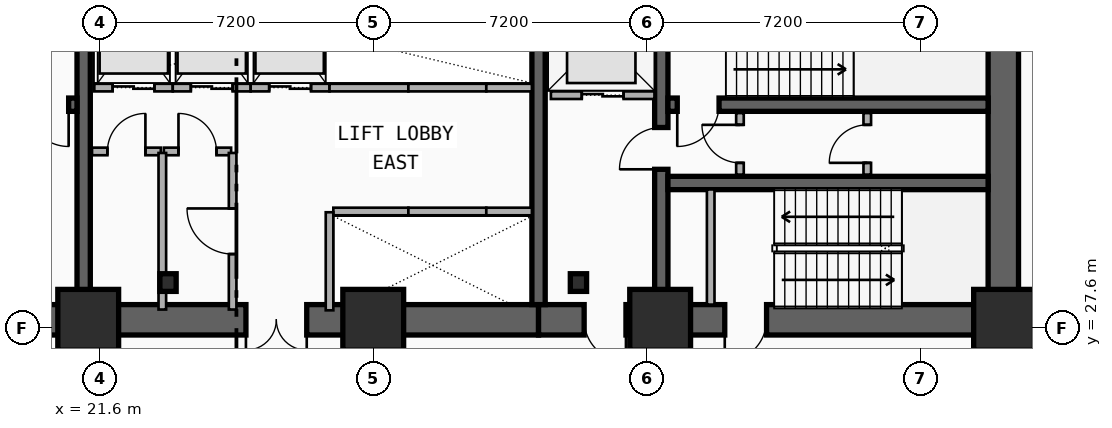
"""IFC4 building model, lengths in metres.
Left out: names, types, materials, properties, quantities, classifications, styles, units other than length and angle.
Written with IfcOpenShell. Run it as: python <this file> out.ifc"""

import sys

from ifc_helpers import new_model, si_unit, direction, frame, frame_2d, origin, origin_2d, place, context, subcontext, project, spatial, rectangle, i_section, extrude, element, fill, save


model = new_model("IFC4")
c1 = context("Model", 3, precision=1e-05, world=origin(), true_north=direction((0.0, 1.0)))
c2 = subcontext(c1, "Body", "Model", "MODEL_VIEW")
j1 = project(units=[si_unit("LENGTHUNIT", "METRE"), si_unit("PLANEANGLEUNIT", "RADIAN")], contexts=[c1])
p1 = place(None, origin())
s1 = spatial("IfcSite", under=j1, at=p1, CompositionType="ELEMENT")
p2 = place(p1, origin())
s2 = spatial("IfcBuilding", under=s1, at=p2, CompositionType="ELEMENT")
p3 = place(p2, frame((0.0, 0.0, 24.2)))
s3 = spatial("IfcBuildingStorey", under=s2, at=p3, CompositionType="ELEMENT", Elevation=24.2)
p4 = place(p3, frame((21.18, 27.82, 0.0), z_axis=(0.0, 0.0, 1.0), x_axis=(-1.0, 0.0, 0.0)))
e1 = element("IfcWall", 1, at=p4, inside=s3, PredefinedType="SHEAR", context=c2, shape_type="SweptSolid", body=[
    extrude(rectangle(XDim=9.03, YDim=0.8, at=frame_2d((4.515, 0.0))), origin(), (0.0, 0.0, 1.0), 4.8),
])
p5 = place(p4, frame((2.68, 0.0, 0.0)))
e2 = element("IfcOpeningElement", 2, at=p5, cuts=e1, PredefinedType="OPENING", context=c2, shape_type="SweptSolid", body=[
    extrude(rectangle(XDim=1.1, YDim=2.15, at=frame_2d((0.55, 1.075))), frame((0.0, 0.41, 0.0), z_axis=(0.0, -1.0, 0.0), x_axis=(1.0, 0.0, 0.0)), (0.0, 0.0, 1.0), 0.82),
])
p6 = place(p3, frame((33.15, 27.82, 0.0), z_axis=(0.0, 0.0, 1.0), x_axis=(-1.0, 0.0, 0.0)))
e3 = element("IfcWall", 3, at=p6, inside=s3, PredefinedType="SHEAR", context=c2, shape_type="SweptSolid", body=[
    extrude(rectangle(XDim=11.97, YDim=0.8, at=frame_2d((5.985, 0.0))), origin(), (0.0, 0.0, 1.0), 4.8),
])
p7 = place(p6, frame((6.1, 0.0, 0.0)))
e4 = element("IfcOpeningElement", 4, at=p7, cuts=e3, PredefinedType="OPENING", context=c2, shape_type="SweptSolid", body=[
    extrude(rectangle(XDim=1.6, YDim=2.2, at=frame_2d((0.8, 1.1))), frame((0.0, 0.41, 0.0), z_axis=(0.0, -1.0, 0.0), x_axis=(1.0, 0.0, 0.0)), (0.0, 0.0, 1.0), 0.82),
])
p8 = place(p3, frame((45.38, 27.82, 0.0), z_axis=(0.0, 0.0, 1.0), x_axis=(-1.0, 0.0, 0.0)))
e5 = element("IfcWall", 5, at=p8, inside=s3, PredefinedType="SHEAR", context=c2, shape_type="SweptSolid", body=[
    extrude(rectangle(XDim=12.23, YDim=0.8, at=frame_2d((6.115, 0.0))), origin(), (0.0, 0.0, 1.0), 4.8),
])
p9 = place(p8, frame((9.93, 0.0, 0.0)))
e6 = element("IfcOpeningElement", 6, at=p9, cuts=e5, PredefinedType="OPENING", context=c2, shape_type="SweptSolid", body=[
    extrude(rectangle(XDim=1.1, YDim=2.15, at=frame_2d((0.55, 1.075))), frame((0.0, 0.41, 0.0), z_axis=(0.0, -1.0, 0.0), x_axis=(1.0, 0.0, 0.0)), (0.0, 0.0, 1.0), 0.82),
])
p10 = place(p8, frame((6.23, 0.0, 0.0)))
e7 = element("IfcOpeningElement", 7, at=p10, cuts=e5, PredefinedType="OPENING", context=c2, shape_type="SweptSolid", body=[
    extrude(rectangle(XDim=1.1, YDim=2.15, at=frame_2d((0.55, 1.075))), frame((0.0, 0.41, 0.0), z_axis=(0.0, -1.0, 0.0), x_axis=(1.0, 0.0, 0.0)), (0.0, 0.0, 1.0), 0.82),
])
p11 = place(p3, frame((45.38, 28.22, 0.0), z_axis=(0.0, 0.0, 1.0), x_axis=(0.0, 1.0, 0.0)))
e8 = element("IfcWall", 8, at=p11, inside=s3, PredefinedType="SHEAR", context=c2, shape_type="SweptSolid", body=[
    extrude(rectangle(XDim=8.43, YDim=0.8, at=frame_2d((4.215, 0.0))), origin(), (0.0, 0.0, 1.0), 4.8),
])
for number, where, z_axis, x_axis in (
    (9, (21.18, 28.22, 0.0), (0.0, 0.0, 1.0), (0.0, 1.0, 0.0)),
    (10, (33.15, 28.22, 0.0), (0.0, 0.0, 1.0), (0.0, 1.0, 0.0)),
):
    element("IfcWall", number, at=place(p3, frame(where, z_axis=z_axis, x_axis=x_axis)), inside=s3, PredefinedType="SHEAR", context=c2, shape_type="SweptSolid", body=[
        extrude(rectangle(XDim=8.43, YDim=0.35, at=frame_2d((4.215, 0.0))), origin(), (0.0, 0.0, 1.0), 4.8),
    ])
p12 = place(p3, frame((36.38, 28.22, 0.0), z_axis=(0.0, 0.0, 1.0), x_axis=(0.0, 1.0, 0.0)))
e11 = element("IfcWall", 11, at=p12, inside=s3, PredefinedType="SHEAR", context=c2, shape_type="SweptSolid", body=[
    extrude(rectangle(XDim=8.43, YDim=0.35, at=frame_2d((4.215, 0.0))), origin(), (0.0, 0.0, 1.0), 4.8),
])
p13 = place(p12, frame((3.56, 0.0, 0.0)))
e12 = element("IfcOpeningElement", 12, at=p13, cuts=e11, PredefinedType="OPENING", context=c2, shape_type="SweptSolid", body=[
    extrude(rectangle(XDim=1.1, YDim=2.15, at=frame_2d((0.55, 1.075))), frame((0.0, 0.185, 0.0), z_axis=(0.0, -1.0, 0.0), x_axis=(1.0, 0.0, 0.0)), (0.0, 0.0, 1.0), 0.37),
])
p14 = place(p3, frame((21.005, 33.48, 0.0), z_axis=(0.0, 0.0, 1.0), x_axis=(-1.0, 0.0, 0.0)))
e13 = element("IfcWall", 13, at=p14, inside=s3, PredefinedType="SHEAR", context=c2, shape_type="SweptSolid", body=[
    extrude(rectangle(XDim=8.455, YDim=0.35, at=frame_2d((4.228, 0.0))), origin(), (0.0, 0.0, 1.0), 4.8),
])
p15 = place(p14, frame((0.22, 0.0, 0.0)))
e14 = element("IfcOpeningElement", 14, at=p15, cuts=e13, PredefinedType="OPENING", context=c2, shape_type="SweptSolid", body=[
    extrude(rectangle(XDim=1.1, YDim=2.15, at=frame_2d((0.55, 1.075))), frame((0.0, 0.185, 0.0), z_axis=(0.0, -1.0, 0.0), x_axis=(1.0, 0.0, 0.0)), (0.0, 0.0, 1.0), 0.37),
])
p16 = place(p3, frame((44.98, 33.48, 0.0), z_axis=(0.0, 0.0, 1.0), x_axis=(-1.0, 0.0, 0.0)))
e15 = element("IfcWall", 15, at=p16, inside=s3, PredefinedType="SHEAR", context=c2, shape_type="SweptSolid", body=[
    extrude(rectangle(XDim=8.425, YDim=0.35, at=frame_2d((4.212, 0.0))), origin(), (0.0, 0.0, 1.0), 4.8),
])
p17 = place(p16, frame((7.08, 0.0, 0.0)))
e16 = element("IfcOpeningElement", 16, at=p17, cuts=e15, PredefinedType="OPENING", context=c2, shape_type="SweptSolid", body=[
    extrude(rectangle(XDim=1.1, YDim=2.15, at=frame_2d((0.55, 1.075))), frame((0.0, 0.185, 0.0), z_axis=(0.0, -1.0, 0.0), x_axis=(1.0, 0.0, 0.0)), (0.0, 0.0, 1.0), 0.37),
])
p18 = place(p3, frame((36.555, 31.42, 0.0), z_axis=(0.0, 0.0, 1.0), x_axis=(1.0, 0.0, 0.0)))
e17 = element("IfcWall", 17, at=p18, inside=s3, PredefinedType="SHEAR", context=c2, shape_type="SweptSolid", body=[
    extrude(rectangle(XDim=8.425, YDim=0.35, at=frame_2d((4.212, 0.0))), origin(), (0.0, 0.0, 1.0), 4.8),
])
for number, where, z_axis, x_axis in (
    (18, (23.4, 28.8, 0.0), (0.0, 0.0, 1.0), (1.0, 0.0, 0.0)),
    (19, (34.2, 28.8, 0.0), (0.0, 0.0, 1.0), (1.0, 0.0, 0.0)),
):
    element("IfcColumn", number, at=place(p3, frame(where, z_axis=z_axis, x_axis=x_axis)), inside=s3, PredefinedType="COLUMN", context=c2, shape_type="SweptSolid", body=[
        extrude(i_section(OverallWidth=0.428, OverallDepth=0.465, WebThickness=0.045, FlangeThickness=0.073, FilletRadius=0.015, at=origin_2d()), origin(), (0.0, 0.0, 1.0), 4.8),
    ])
for number, where, z_axis, x_axis in (
    (20, (21.3, 27.82, 0.0), (0.0, 0.0, 1.0), (1.0, 0.0, 0.0)),
    (21, (28.8, 27.82, 0.0), (0.0, 0.0, 1.0), (1.0, 0.0, 0.0)),
    (22, (36.35, 27.82, 0.0), (0.0, 0.0, 1.0), (1.0, 0.0, 0.0)),
    (23, (45.4, 27.82, 0.0), (0.0, 0.0, 1.0), (1.0, 0.0, 0.0)),
):
    element("IfcColumn", number, at=place(p3, frame(where, z_axis=z_axis, x_axis=x_axis)), inside=s3, PredefinedType="COLUMN", context=c2, shape_type="SweptSolid", body=[
        extrude(rectangle(XDim=1.6, YDim=1.6, at=origin_2d()), origin(), (0.0, 0.0, 1.0), 4.8),
    ])
p19 = place(p3, frame((33.475, 33.73, 0.0), z_axis=(0.0, 0.0, 1.0), x_axis=(1.0, 0.0, 0.0)))
e24 = element("IfcWall", 24, at=p19, inside=s3, PredefinedType="PARTITIONING", context=c2, shape_type="SweptSolid", body=[
    extrude(rectangle(XDim=2.725, YDim=0.2, at=frame_2d((1.362, 0.0))), origin(), (0.0, 0.0, 1.0), 3.452),
])
p20 = place(p19, frame((0.812, 0.0, 0.0)))
e25 = element("IfcOpeningElement", 25, at=p20, cuts=e24, PredefinedType="OPENING", context=c2, shape_type="SweptSolid", body=[
    extrude(rectangle(XDim=1.1, YDim=2.15, at=frame_2d((0.55, 1.075))), frame((0.0, 0.11, 0.0), z_axis=(0.0, -1.0, 0.0), x_axis=(1.0, 0.0, 0.0)), (0.0, 0.0, 1.0), 0.22),
])
p21 = place(p3, frame((27.75, 30.67, 0.0), z_axis=(0.0, 0.0, 1.0), x_axis=(1.0, 0.0, 0.0)))
e26 = element("IfcWall", 26, at=p21, inside=s3, PredefinedType="PARTITIONING", context=c2, shape_type="SweptSolid", body=[
    extrude(rectangle(XDim=1.975, YDim=0.2, at=frame_2d((0.988, 0.0))), origin(), (0.0, 0.0, 1.0), 3.452),
])
p22 = place(p3, frame((27.65, 28.07, 0.0), z_axis=(0.0, 0.0, 1.0), x_axis=(0.0, 1.0, 0.0)))
e27 = element("IfcWall", 27, at=p22, inside=s3, PredefinedType="PARTITIONING", context=c2, shape_type="SweptSolid", body=[
    extrude(rectangle(XDim=2.58, YDim=0.2, at=frame_2d((1.29, 0.0))), origin(), (0.0, 0.0, 1.0), 3.452),
])
p23 = place(p3, frame((29.725, 30.67, 0.0), z_axis=(0.0, 0.0, 1.0), x_axis=(1.0, 0.0, 0.0)))
e28 = element("IfcWall", 28, at=p23, inside=s3, PredefinedType="PARTITIONING", context=c2, shape_type="SweptSolid", body=[
    extrude(rectangle(XDim=2.05, YDim=0.2, at=frame_2d((1.025, 0.0))), origin(), (0.0, 0.0, 1.0), 4.48),
])
p24 = place(p3, frame((31.775, 30.67, 0.0), z_axis=(0.0, 0.0, 1.0), x_axis=(1.0, 0.0, 0.0)))
e29 = element("IfcWall", 29, at=p24, inside=s3, PredefinedType="PARTITIONING", context=c2, shape_type="SweptSolid", body=[
    extrude(rectangle(XDim=1.2, YDim=0.2, at=frame_2d((0.6, 0.0))), origin(), (0.0, 0.0, 1.0), 4.48),
])
p25 = place(p3, frame((21.46, 33.93, 0.0), z_axis=(0.0, 0.0, 1.0), x_axis=(1.0, 0.0, 0.0)))
e30 = element("IfcWall", 30, at=p25, inside=s3, PredefinedType="PARTITIONING", context=c2, shape_type="SweptSolid", body=[
    extrude(rectangle(XDim=2.065, YDim=0.2, at=frame_2d((1.032, 0.0))), origin(), (0.0, 0.0, 1.0), 3.452),
])
p26 = place(p25, frame((0.482, 0.0, 0.0)))
e31 = element("IfcOpeningElement", 31, at=p26, cuts=e30, PredefinedType="OPENING", context=c2, shape_type="SweptSolid", body=[
    extrude(rectangle(XDim=1.1, YDim=2.15, at=frame_2d((0.55, 1.075))), frame((0.0, 0.11, 0.0), z_axis=(0.0, -1.0, 0.0), x_axis=(1.0, 0.0, 0.0)), (0.0, 0.0, 1.0), 0.22),
])
p27 = place(p3, frame((23.525, 33.93, 0.0), z_axis=(0.0, 0.0, 1.0), x_axis=(1.0, 0.0, 0.0)))
e32 = element("IfcWall", 32, at=p27, inside=s3, PredefinedType="PARTITIONING", context=c2, shape_type="SweptSolid", body=[
    extrude(rectangle(XDim=2.05, YDim=0.2, at=frame_2d((1.025, 0.0))), origin(), (0.0, 0.0, 1.0), 4.48),
])
p28 = place(p27, frame((0.475, 0.0, 0.0)))
e33 = element("IfcOpeningElement", 33, at=p28, cuts=e32, PredefinedType="OPENING", context=c2, shape_type="SweptSolid", body=[
    extrude(rectangle(XDim=1.1, YDim=2.15, at=frame_2d((0.55, 1.075))), frame((0.0, 0.11, 0.0), z_axis=(0.0, -1.0, 0.0), x_axis=(1.0, 0.0, 0.0)), (0.0, 0.0, 1.0), 0.22),
])
p29 = place(p3, frame((25.575, 33.93, 0.0), z_axis=(0.0, 0.0, 1.0), x_axis=(1.0, 0.0, 0.0)))
e34 = element("IfcWall", 34, at=p29, inside=s3, PredefinedType="PARTITIONING", context=c2, shape_type="SweptSolid", body=[
    extrude(rectangle(XDim=2.075, YDim=0.2, at=frame_2d((1.038, 0.0))), origin(), (0.0, 0.0, 1.0), 4.48),
])
p30 = place(p29, frame((0.488, 0.0, 0.0)))
e35 = element("IfcOpeningElement", 35, at=p30, cuts=e34, PredefinedType="OPENING", context=c2, shape_type="SweptSolid", body=[
    extrude(rectangle(XDim=1.1, YDim=2.15, at=frame_2d((0.55, 1.075))), frame((0.0, 0.11, 0.0), z_axis=(0.0, -1.0, 0.0), x_axis=(1.0, 0.0, 0.0)), (0.0, 0.0, 1.0), 0.22),
])
p31 = place(p3, frame((27.65, 33.93, 0.0), z_axis=(0.0, 0.0, 1.0), x_axis=(1.0, 0.0, 0.0)))
e36 = element("IfcWall", 36, at=p31, inside=s3, PredefinedType="PARTITIONING", context=c2, shape_type="SweptSolid", body=[
    extrude(rectangle(XDim=2.075, YDim=0.2, at=frame_2d((1.038, 0.0))), origin(), (0.0, 0.0, 1.0), 3.452),
])
p32 = place(p3, frame((29.725, 33.93, 0.0), z_axis=(0.0, 0.0, 1.0), x_axis=(1.0, 0.0, 0.0)))
e37 = element("IfcWall", 37, at=p32, inside=s3, PredefinedType="PARTITIONING", context=c2, shape_type="SweptSolid", body=[
    extrude(rectangle(XDim=2.05, YDim=0.2, at=frame_2d((1.025, 0.0))), origin(), (0.0, 0.0, 1.0), 4.48),
])
p33 = place(p3, frame((31.775, 33.93, 0.0), z_axis=(0.0, 0.0, 1.0), x_axis=(1.0, 0.0, 0.0)))
e38 = element("IfcWall", 38, at=p33, inside=s3, PredefinedType="PARTITIONING", context=c2, shape_type="SweptSolid", body=[
    extrude(rectangle(XDim=1.2, YDim=0.2, at=frame_2d((0.6, 0.0))), origin(), (0.0, 0.0, 1.0), 4.48),
])
p34 = place(p3, frame((37.68, 28.22, 0.0), z_axis=(0.0, 0.0, 1.0), x_axis=(0.0, 1.0, 0.0)))
e39 = element("IfcWall", 39, at=p34, inside=s3, PredefinedType="PARTITIONING", context=c2, shape_type="SweptSolid", body=[
    extrude(rectangle(XDim=3.03, YDim=0.2, at=frame_2d((1.515, 0.0))), origin(), (0.0, 0.0, 1.0), 4.48),
])
p35 = place(p3, frame((38.45, 31.64, 0.0), z_axis=(0.0, 0.0, 1.0), x_axis=(0.0, 1.0, 0.0)))
e40 = element("IfcWall", 40, at=p35, inside=s3, PredefinedType="PARTITIONING", context=c2, shape_type="SweptSolid", body=[
    extrude(rectangle(XDim=1.62, YDim=0.2, at=frame_2d((0.81, 0.0))), origin(), (0.0, 0.0, 1.0), 4.48),
])
p36 = place(p35, frame((0.31, 0.0, 0.0)))
e41 = element("IfcOpeningElement", 41, at=p36, cuts=e40, PredefinedType="OPENING", context=c2, shape_type="SweptSolid", body=[
    extrude(rectangle(XDim=1.0, YDim=2.15, at=frame_2d((0.5, 1.075))), frame((0.0, 0.11, 0.0), z_axis=(0.0, -1.0, 0.0), x_axis=(1.0, 0.0, 0.0)), (0.0, 0.0, 1.0), 0.22),
])
p37 = place(p3, frame((41.8, 31.64, 0.0), z_axis=(0.0, 0.0, 1.0), x_axis=(0.0, 1.0, 0.0)))
e42 = element("IfcWall", 42, at=p37, inside=s3, PredefinedType="PARTITIONING", context=c2, shape_type="SweptSolid", body=[
    extrude(rectangle(XDim=1.62, YDim=0.2, at=frame_2d((0.81, 0.0))), origin(), (0.0, 0.0, 1.0), 4.48),
])
p38 = place(p37, frame((0.31, 0.0, 0.0)))
e43 = element("IfcOpeningElement", 43, at=p38, cuts=e42, PredefinedType="OPENING", context=c2, shape_type="SweptSolid", body=[
    extrude(rectangle(XDim=1.0, YDim=2.15, at=frame_2d((0.5, 1.075))), frame((0.0, 0.11, 0.0), z_axis=(0.0, -1.0, 0.0), x_axis=(1.0, 0.0, 0.0)), (0.0, 0.0, 1.0), 0.22),
])
p39 = place(p3, frame((21.4, 32.25, 0.0), z_axis=(0.0, 0.0, 1.0), x_axis=(1.0, 0.0, 0.0)))
e44 = element("IfcWall", 44, at=p39, inside=s3, PredefinedType="PARTITIONING", context=c2, shape_type="SweptSolid", body=[
    extrude(rectangle(XDim=1.81, YDim=0.2, at=frame_2d((0.905, 0.0))), origin(), (0.0, 0.0, 1.0), 3.452),
])
p40 = place(p39, frame((0.405, 0.0, 0.0)))
e45 = element("IfcOpeningElement", 45, at=p40, cuts=e44, PredefinedType="OPENING", context=c2, shape_type="SweptSolid", body=[
    extrude(rectangle(XDim=1.0, YDim=2.15, at=frame_2d((0.5, 1.075))), frame((0.0, 0.11, 0.0), z_axis=(0.0, -1.0, 0.0), x_axis=(1.0, 0.0, 0.0)), (0.0, 0.0, 1.0), 0.22),
])
p41 = place(p3, frame((23.29, 32.25, 0.0), z_axis=(0.0, 0.0, 1.0), x_axis=(1.0, 0.0, 0.0)))
e46 = element("IfcWall", 46, at=p41, inside=s3, PredefinedType="PARTITIONING", context=c2, shape_type="SweptSolid", body=[
    extrude(rectangle(XDim=1.77, YDim=0.2, at=frame_2d((0.885, 0.0))), origin(), (0.0, 0.0, 1.0), 4.48),
])
p42 = place(p41, frame((0.385, 0.0, 0.0)))
e47 = element("IfcOpeningElement", 47, at=p42, cuts=e46, PredefinedType="OPENING", context=c2, shape_type="SweptSolid", body=[
    extrude(rectangle(XDim=1.0, YDim=2.15, at=frame_2d((0.5, 1.075))), frame((0.0, 0.11, 0.0), z_axis=(0.0, -1.0, 0.0), x_axis=(1.0, 0.0, 0.0)), (0.0, 0.0, 1.0), 0.22),
])
p43 = place(p3, frame((25.1, 28.09, 0.0), z_axis=(0.0, 0.0, 1.0), x_axis=(0.0, 1.0, 0.0)))
e48 = element("IfcWall", 48, at=p43, inside=s3, PredefinedType="PARTITIONING", context=c2, shape_type="SweptSolid", body=[
    extrude(rectangle(XDim=4.12, YDim=0.2, at=frame_2d((2.06, 0.0))), origin(), (0.0, 0.0, 1.0), 4.48),
])
p44 = place(p43, frame((1.46, 0.0, 0.0)))
e49 = element("IfcOpeningElement", 49, at=p44, cuts=e48, PredefinedType="OPENING", context=c2, shape_type="SweptSolid", body=[
    extrude(rectangle(XDim=1.2, YDim=2.15, at=frame_2d((0.6, 1.075))), frame((0.0, 0.11, 0.0), z_axis=(0.0, -1.0, 0.0), x_axis=(1.0, 0.0, 0.0)), (0.0, 0.0, 1.0), 0.22),
])
p45 = place(p3, frame((23.25, 28.09, 0.0), z_axis=(0.0, 0.0, 1.0), x_axis=(0.0, 1.0, 0.0)))
e50 = element("IfcWall", 50, at=p45, inside=s3, PredefinedType="PARTITIONING", context=c2, shape_type="SweptSolid", body=[
    extrude(rectangle(XDim=4.12, YDim=0.2, at=frame_2d((2.06, 0.0))), origin(), (0.0, 0.0, 1.0), 4.48),
])
p46 = place(p3, frame((45.41, 27.6, 0.0), z_axis=(0.0, 0.0, 1.0), x_axis=(1.0, 0.0, 0.0)))
e51 = element("IfcWall", 51, at=p46, inside=s3, PredefinedType="PARTITIONING", context=c2, shape_type="SweptSolid", body=[
    extrude(rectangle(XDim=0.91, YDim=0.16, at=frame_2d((0.455, 0.0))), origin(), (0.0, 0.0, 1.0), 3.452),
])
p47 = place(p20, origin())
e52 = element("IfcDoor", 52, at=p47, inside=s3, OperationType="DOUBLE_DOOR_SLIDING", PredefinedType="DOOR", context=c2, shape_type="SweptSolid", body=[
    extrude(rectangle(XDim=1.1, YDim=2.15, at=frame_2d((0.55, 1.075))), frame((0.0, 0.025, 0.0), z_axis=(0.0, -1.0, 0.0), x_axis=(1.0, 0.0, 0.0)), (0.0, 0.0, 1.0), 0.05),
])
fill(e25, e52)
p48 = place(p26, origin())
e53 = element("IfcDoor", 53, at=p48, inside=s3, OperationType="DOUBLE_DOOR_SLIDING", PredefinedType="DOOR", context=c2, shape_type="SweptSolid", body=[
    extrude(rectangle(XDim=1.1, YDim=2.15, at=frame_2d((0.55, 1.075))), frame((0.0, 0.025, 0.0), z_axis=(0.0, -1.0, 0.0), x_axis=(1.0, 0.0, 0.0)), (0.0, 0.0, 1.0), 0.05),
])
fill(e31, e53)
p49 = place(p28, origin())
e54 = element("IfcDoor", 54, at=p49, inside=s3, OperationType="DOUBLE_DOOR_SLIDING", PredefinedType="DOOR", context=c2, shape_type="SweptSolid", body=[
    extrude(rectangle(XDim=1.1, YDim=2.15, at=frame_2d((0.55, 1.075))), frame((0.0, 0.025, 0.0), z_axis=(0.0, -1.0, 0.0), x_axis=(1.0, 0.0, 0.0)), (0.0, 0.0, 1.0), 0.05),
])
fill(e33, e54)
p50 = place(p30, origin())
e55 = element("IfcDoor", 55, at=p50, inside=s3, OperationType="DOUBLE_DOOR_SLIDING", PredefinedType="DOOR", context=c2, shape_type="SweptSolid", body=[
    extrude(rectangle(XDim=1.1, YDim=2.15, at=frame_2d((0.55, 1.075))), frame((0.0, 0.025, 0.0), z_axis=(0.0, -1.0, 0.0), x_axis=(1.0, 0.0, 0.0)), (0.0, 0.0, 1.0), 0.05),
])
fill(e35, e55)
p51 = place(p15, origin())
e56 = element("IfcDoor", 56, at=p51, inside=s3, OperationType="SINGLE_SWING_LEFT", PredefinedType="DOOR", context=c2, shape_type="SweptSolid", body=[
    extrude(rectangle(XDim=1.1, YDim=2.15, at=frame_2d((0.55, 1.075))), frame((0.0, 0.025, 0.0), z_axis=(0.0, -1.0, 0.0), x_axis=(1.0, 0.0, 0.0)), (0.0, 0.0, 1.0), 0.05),
])
fill(e14, e56)
p52 = place(p17, origin())
e57 = element("IfcDoor", 57, at=p52, inside=s3, OperationType="SINGLE_SWING_RIGHT", PredefinedType="DOOR", context=c2, shape_type="SweptSolid", body=[
    extrude(rectangle(XDim=1.1, YDim=2.15, at=frame_2d((0.55, 1.075))), frame((0.0, 0.025, 0.0), z_axis=(0.0, -1.0, 0.0), x_axis=(1.0, 0.0, 0.0)), (0.0, 0.0, 1.0), 0.05),
])
fill(e16, e57)
p53 = place(p13, origin())
e58 = element("IfcDoor", 58, at=p53, inside=s3, OperationType="SINGLE_SWING_LEFT", PredefinedType="DOOR", context=c2, shape_type="SweptSolid", body=[
    extrude(rectangle(XDim=1.1, YDim=2.15, at=frame_2d((0.55, 1.075))), frame((0.0, 0.025, 0.0), z_axis=(0.0, -1.0, 0.0), x_axis=(1.0, 0.0, 0.0)), (0.0, 0.0, 1.0), 0.05),
])
fill(e12, e58)
p54 = place(p9, origin())
e59 = element("IfcDoor", 59, at=p54, inside=s3, OperationType="SINGLE_SWING_LEFT", PredefinedType="DOOR", context=c2, shape_type="SweptSolid", body=[
    extrude(rectangle(XDim=1.1, YDim=2.15, at=frame_2d((0.55, 1.075))), frame((0.0, 0.025, 0.0), z_axis=(0.0, -1.0, 0.0), x_axis=(1.0, 0.0, 0.0)), (0.0, 0.0, 1.0), 0.05),
])
fill(e6, e59)
p55 = place(p10, origin())
e60 = element("IfcDoor", 60, at=p55, inside=s3, OperationType="SINGLE_SWING_RIGHT", PredefinedType="DOOR", context=c2, shape_type="SweptSolid", body=[
    extrude(rectangle(XDim=1.1, YDim=2.15, at=frame_2d((0.55, 1.075))), frame((0.0, 0.025, 0.0), z_axis=(0.0, -1.0, 0.0), x_axis=(1.0, 0.0, 0.0)), (0.0, 0.0, 1.0), 0.05),
])
fill(e7, e60)
p56 = place(p7, origin())
e61 = element("IfcDoor", 61, at=p56, inside=s3, OperationType="SINGLE_SWING_LEFT", PredefinedType="DOOR", context=c2, shape_type="SweptSolid", body=[
    extrude(rectangle(XDim=1.6, YDim=2.2, at=frame_2d((0.8, 1.1))), frame((0.0, 0.025, 0.0), z_axis=(0.0, -1.0, 0.0), x_axis=(1.0, 0.0, 0.0)), (0.0, 0.0, 1.0), 0.05),
])
fill(e4, e61)
p57 = place(p36, origin())
e62 = element("IfcDoor", 62, at=p57, inside=s3, OperationType="SINGLE_SWING_RIGHT", PredefinedType="DOOR", context=c2, shape_type="SweptSolid", body=[
    extrude(rectangle(XDim=1.0, YDim=2.15, at=frame_2d((0.5, 1.075))), frame((0.0, 0.025, 0.0), z_axis=(0.0, -1.0, 0.0), x_axis=(1.0, 0.0, 0.0)), (0.0, 0.0, 1.0), 0.05),
])
fill(e41, e62)
p58 = place(p38, origin())
e63 = element("IfcDoor", 63, at=p58, inside=s3, OperationType="SINGLE_SWING_LEFT", PredefinedType="DOOR", context=c2, shape_type="SweptSolid", body=[
    extrude(rectangle(XDim=1.0, YDim=2.15, at=frame_2d((0.5, 1.075))), frame((0.0, 0.025, 0.0), z_axis=(0.0, -1.0, 0.0), x_axis=(1.0, 0.0, 0.0)), (0.0, 0.0, 1.0), 0.05),
])
fill(e43, e63)
p59 = place(p40, origin())
e64 = element("IfcDoor", 64, at=p59, inside=s3, OperationType="SINGLE_SWING_RIGHT", PredefinedType="DOOR", context=c2, shape_type="SweptSolid", body=[
    extrude(rectangle(XDim=1.0, YDim=2.15, at=frame_2d((0.5, 1.075))), frame((0.0, 0.025, 0.0), z_axis=(0.0, -1.0, 0.0), x_axis=(1.0, 0.0, 0.0)), (0.0, 0.0, 1.0), 0.05),
])
fill(e45, e64)
p60 = place(p42, origin())
e65 = element("IfcDoor", 65, at=p60, inside=s3, OperationType="SINGLE_SWING_LEFT", PredefinedType="DOOR", context=c2, shape_type="SweptSolid", body=[
    extrude(rectangle(XDim=1.0, YDim=2.15, at=frame_2d((0.5, 1.075))), frame((0.0, 0.025, 0.0), z_axis=(0.0, -1.0, 0.0), x_axis=(1.0, 0.0, 0.0)), (0.0, 0.0, 1.0), 0.05),
])
fill(e47, e65)
p61 = place(p44, origin())
e66 = element("IfcDoor", 66, at=p61, inside=s3, OperationType="SINGLE_SWING_RIGHT", PredefinedType="DOOR", context=c2, shape_type="SweptSolid", body=[
    extrude(rectangle(XDim=1.2, YDim=2.15, at=frame_2d((0.6, 1.075))), frame((0.0, 0.025, 0.0), z_axis=(0.0, -1.0, 0.0), x_axis=(1.0, 0.0, 0.0)), (0.0, 0.0, 1.0), 0.05),
])
fill(e49, e66)
save(model, sys.argv[1])
